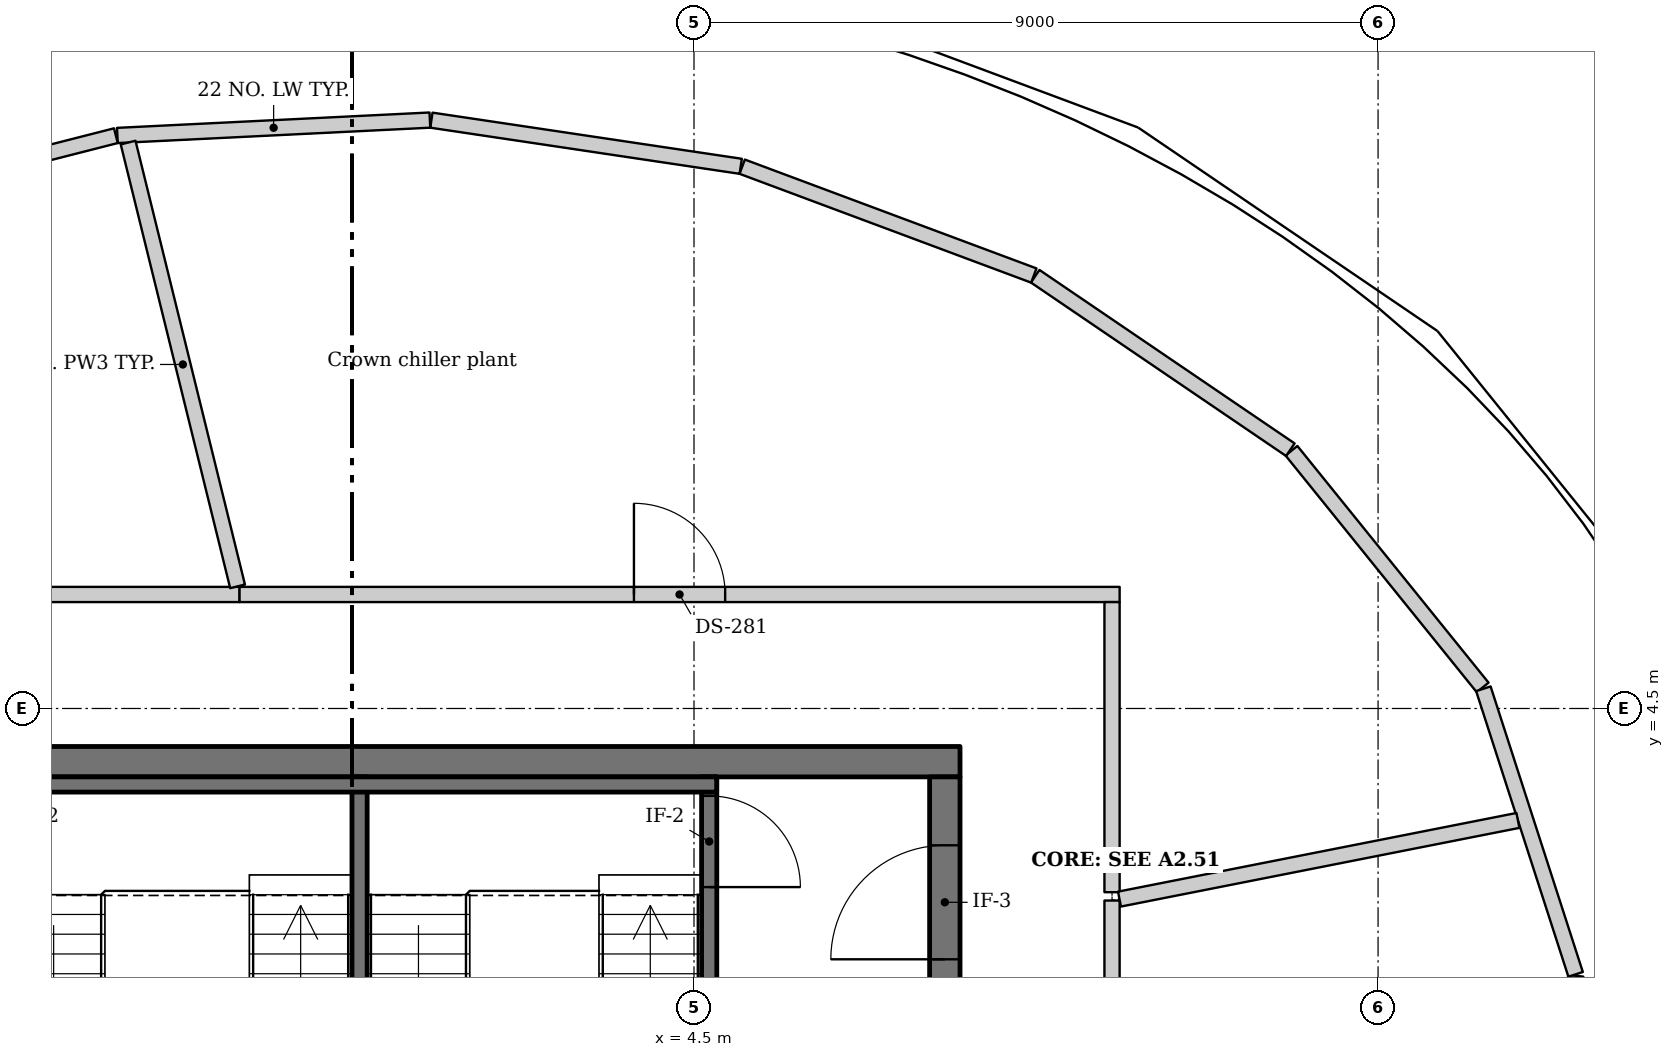
"""IFC4 building model, lengths in metres.
Left out: names, types, materials, properties, quantities, classifications, styles, units other than length and angle.
Written with IfcOpenShell. Run it as: python <this file> out.ifc"""

import sys

from ifc_helpers import new_model, si_unit, direction, frame, frame_2d, origin, place, context, subcontext, project, spatial, rectangle, extrude, source, transform, mapped, element, fill, save


model = new_model("IFC4")
c1 = context("Model", 3, precision=1e-05, world=origin(), true_north=direction((0.0, 1.0)))
c2 = subcontext(c1, "Body", "Model", "MODEL_VIEW")
j1 = project(units=[si_unit("LENGTHUNIT", "METRE"), si_unit("PLANEANGLEUNIT", "RADIAN")], contexts=[c1])
p1 = place(None, origin())
s1 = spatial("IfcSite", under=j1, at=p1, CompositionType="ELEMENT")
p2 = place(p1, origin())
s2 = spatial("IfcBuilding", under=s1, at=p2, CompositionType="ELEMENT")
p3 = place(p2, frame((0.0, 0.0, 356.5)))
s3 = spatial("IfcBuildingStorey", under=s2, at=p3, CompositionType="ELEMENT", Elevation=356.5)
m1 = source(origin(), c2, "Body", "SweptSolid", [
    extrude(rectangle(XDim=16.0, YDim=0.4, at=frame_2d((8.0, 0.0))), origin(), (0.0, 0.0, 1.0), 4.25),
])
p4 = place(p3, frame((-8.0, 3.8, 0.0), z_axis=(0.0, 0.0, 1.0), x_axis=(1.0, 0.0, 0.0)))
e1 = element("IfcWall", 1, at=p4, inside=s3, PredefinedType="SHEAR", context=c2, shape_type="MappedRepresentation", body=[
    mapped(m1, transform((0.0, 0.0, 0.0))),
])
m2 = source(origin(), c2, "Body", "SweptSolid", [
    extrude(rectangle(XDim=7.2, YDim=0.4, at=frame_2d((3.6, 0.0))), origin(), (0.0, 0.0, 1.0), 4.25),
])
p5 = place(p3, frame((7.8, -3.6, 0.0), z_axis=(0.0, 0.0, 1.0), x_axis=(0.0, 1.0, 0.0)))
e2 = element("IfcWall", 2, at=p5, inside=s3, PredefinedType="SHEAR", context=c2, shape_type="MappedRepresentation", body=[
    mapped(m2, transform((0.0, 0.0, 0.0))),
])
m3 = source(origin(), c2, "Body", "SweptSolid", [
    extrude(rectangle(XDim=1.5, YDim=2.1, at=frame_2d((0.75, 1.05))), frame((0.0, 0.21, 0.0), z_axis=(0.0, -1.0, 0.0), x_axis=(1.0, 0.0, 0.0)), (0.0, 0.0, 1.0), 0.42),
])
p6 = place(p5, frame((4.8, 0.0, 0.0)))
e3 = element("IfcOpeningElement", 3, at=p6, cuts=e2, PredefinedType="OPENING", context=c2, shape_type="MappedRepresentation", body=[
    mapped(m3, transform((0.0, 0.0, 0.0))),
])
m4 = source(origin(), c2, "Body", "SweptSolid", [
    extrude(rectangle(XDim=4.004, YDim=0.2, at=frame_2d((2.002, 0.0))), origin(), (0.0, 0.0, 1.0), 4.25),
])
p7 = place(p3, frame((12.361, 7.892, 0.0), z_axis=(0.0, 0.0, 1.0), x_axis=(0.628317235809, -0.777957229663, 0.0)))
e4 = element("IfcWall", 4, at=p7, inside=s3, PredefinedType="SOLIDWALL", context=c2, shape_type="MappedRepresentation", body=[
    mapped(m4, transform((0.0, 0.0, 0.0))),
])
m5 = source(origin(), c2, "Body", "SweptSolid", [
    extrude(rectangle(XDim=4.06, YDim=0.2, at=frame_2d((2.03, 0.0))), origin(), (0.0, 0.0, 1.0), 4.25),
])
p8 = place(p3, frame((8.989, 10.188, 0.0), z_axis=(0.0, 0.0, 1.0), x_axis=(0.826945516506, -0.562282057984, 0.0)))
e5 = element("IfcWall", 5, at=p8, inside=s3, PredefinedType="SOLIDWALL", context=c2, shape_type="MappedRepresentation", body=[
    mapped(m5, transform((0.0, 0.0, 0.0))),
])
m6 = source(origin(), c2, "Body", "SweptSolid", [
    extrude(rectangle(XDim=4.095, YDim=0.2, at=frame_2d((2.048, 0.0))), origin(), (0.0, 0.0, 1.0), 4.25),
])
p9 = place(p3, frame((5.134, 11.629, 0.0), z_axis=(0.0, 0.0, 1.0), x_axis=(0.936867035119, -0.349685799695, 0.0)))
e6 = element("IfcWall", 6, at=p9, inside=s3, PredefinedType="SOLIDWALL", context=c2, shape_type="MappedRepresentation", body=[
    mapped(m6, transform((0.0, 0.0, 0.0))),
])
m7 = source(origin(), c2, "Body", "SweptSolid", [
    extrude(rectangle(XDim=4.115, YDim=0.2, at=frame_2d((2.057, 0.0))), origin(), (0.0, 0.0, 1.0), 4.25),
])
p10 = place(p3, frame((1.045, 12.241, 0.0), z_axis=(0.0, 0.0, 1.0), x_axis=(0.989052252856, -0.147565717971, 0.0)))
e7 = element("IfcWall", 7, at=p10, inside=s3, PredefinedType="SOLIDWALL", context=c2, shape_type="MappedRepresentation", body=[
    mapped(m7, transform((0.0, 0.0, 0.0))),
])
m8 = source(origin(), c2, "Body", "SweptSolid", [
    extrude(rectangle(XDim=4.116, YDim=0.2, at=frame_2d((2.058, 0.0))), origin(), (0.0, 0.0, 1.0), 4.25),
])
p11 = place(p3, frame((-3.086, 12.04, 0.0), z_axis=(0.0, 0.0, 1.0), x_axis=(0.998790641863, 0.049165574616, 0.0)))
e8 = element("IfcWall", 8, at=p11, inside=s3, PredefinedType="SOLIDWALL", context=c2, shape_type="MappedRepresentation", body=[
    mapped(m8, transform((0.0, 0.0, 0.0))),
])
m9 = source(origin(), c2, "Body", "SweptSolid", [
    extrude(rectangle(XDim=4.107, YDim=0.2, at=frame_2d((2.054, 0.0))), origin(), (0.0, 0.0, 1.0), 4.25),
])
p12 = place(p3, frame((-7.086, 11.021, 0.0), z_axis=(0.0, 0.0, 1.0), x_axis=(0.96894922759, 0.247259770996, 0.0)))
e9 = element("IfcWall", 9, at=p12, inside=s3, PredefinedType="SOLIDWALL", context=c2, shape_type="MappedRepresentation", body=[
    mapped(m9, transform((0.0, 0.0, 0.0))),
])
m10 = source(origin(), c2, "Body", "SweptSolid", [
    extrude(rectangle(XDim=3.933, YDim=0.2, at=frame_2d((1.966, 0.0))), origin(), (0.0, 0.0, 1.0), 4.25),
])
p13 = place(p3, frame((16.101, 0.983, 0.0), z_axis=(0.0, 0.0, 1.0), x_axis=(-0.10577691274, -0.994389885674, 0.0)))
e10 = element("IfcWall", 10, at=p13, inside=s3, PredefinedType="SOLIDWALL", context=c2, shape_type="MappedRepresentation", body=[
    mapped(m10, transform((0.0, 0.0, 0.0))),
])
m11 = source(origin(), c2, "Body", "SweptSolid", [
    extrude(rectangle(XDim=3.948, YDim=0.2, at=frame_2d((1.974, 0.0))), origin(), (0.0, 0.0, 1.0), 4.25),
])
p14 = place(p3, frame((14.885, 4.76, 0.0), z_axis=(0.0, 0.0, 1.0), x_axis=(0.307365880997, -0.951591411898, 0.0)))
e11 = element("IfcWall", 11, at=p14, inside=s3, PredefinedType="SOLIDWALL", context=c2, shape_type="MappedRepresentation", body=[
    mapped(m11, transform((0.0, 0.0, 0.0))),
])
m12 = source(origin(), c2, "Body", "SweptSolid", [
    extrude(rectangle(XDim=7.2, YDim=0.2, at=frame_2d((3.6, 0.0))), origin(), (0.0, 0.0, 1.0), 4.25),
])
p15 = place(p3, frame((0.1, 3.6, 0.0), z_axis=(0.0, 0.0, 1.0), x_axis=(0.0, -1.0, 0.0)))
e12 = element("IfcWall", 12, at=p15, inside=s3, PredefinedType="SHEAR", context=c2, shape_type="MappedRepresentation", body=[
    mapped(m12, transform((0.0, 0.0, 0.0))),
])
p16 = place(p3, frame((4.7, -3.6, 0.0), z_axis=(0.0, 0.0, 1.0), x_axis=(0.0, 1.0, 0.0)))
e13 = element("IfcWall", 13, at=p16, inside=s3, PredefinedType="SHEAR", context=c2, shape_type="MappedRepresentation", body=[
    mapped(m12, transform((0.0, 0.0, 0.0))),
])
m13 = source(origin(), c2, "Body", "SweptSolid", [
    extrude(rectangle(XDim=1.2, YDim=2.1, at=frame_2d((0.6, 1.05))), frame((0.0, 0.11, 0.0), z_axis=(0.0, -1.0, 0.0), x_axis=(1.0, 0.0, 0.0)), (0.0, 0.0, 1.0), 0.22),
])
p17 = place(p16, frame((5.75, 0.0, 0.0)))
e14 = element("IfcOpeningElement", 14, at=p17, cuts=e13, PredefinedType="OPENING", context=c2, shape_type="MappedRepresentation", body=[
    mapped(m13, transform((0.0, 0.0, 0.0))),
])
m14 = source(origin(), c2, "Body", "SweptSolid", [
    extrude(rectangle(XDim=9.596, YDim=0.2, at=frame_2d((4.798, 0.0))), origin(), (0.0, 0.0, 1.0), 4.25),
])
p18 = place(p3, frame((4.798, 3.5, 0.0), z_axis=(0.0, 0.0, 1.0), x_axis=(-1.0, 0.0, 0.0)))
e15 = element("IfcWall", 15, at=p18, inside=s3, PredefinedType="SHEAR", context=c2, shape_type="MappedRepresentation", body=[
    mapped(m14, transform((0.0, 0.0, 0.0))),
])
m15 = source(origin(), c2, "Body", "SweptSolid", [
    extrude(rectangle(XDim=8.621, YDim=0.2, at=frame_2d((4.311, 0.0))), origin(), (0.0, 0.0, 1.0), 4.25),
])
p19 = place(p3, frame((-10.1, 6.0, 0.0), z_axis=(0.0, 0.0, 1.0), x_axis=(1.0, 0.0, 0.0)))
e16 = element("IfcWall", 16, at=p19, inside=s3, PredefinedType="PARTITIONING", context=c2, shape_type="MappedRepresentation", body=[
    mapped(m15, transform((0.0, 0.0, 0.0))),
])
p20 = place(p19, frame((3.711, 0.0, 0.0)))
e17 = element("IfcOpeningElement", 17, at=p20, cuts=e16, PredefinedType="OPENING", context=c2, shape_type="MappedRepresentation", body=[
    mapped(m13, transform((0.0, 0.0, 0.0))),
])
m16 = source(origin(), c2, "Body", "SweptSolid", [
    extrude(rectangle(XDim=6.014, YDim=0.2, at=frame_2d((3.007, 0.0))), origin(), (0.0, 0.0, 1.0), 4.25),
])
p21 = place(p3, frame((-1.505, 6.107, 0.0), z_axis=(0.0, 0.0, 1.0), x_axis=(-0.239468317603, 0.970904179033, 0.0)))
e18 = element("IfcWall", 18, at=p21, inside=s3, PredefinedType="PARTITIONING", context=c2, shape_type="MappedRepresentation", body=[
    mapped(m16, transform((0.0, 0.0, 0.0))),
])
m17 = source(origin(), c2, "Body", "SweptSolid", [
    extrude(rectangle(XDim=11.579, YDim=0.2, at=frame_2d((5.79, 0.0))), origin(), (0.0, 0.0, 1.0), 4.25),
])
p22 = place(p3, frame((-1.479, 6.0, 0.0), z_axis=(0.0, 0.0, 1.0), x_axis=(1.0, 0.0, 0.0)))
e19 = element("IfcWall", 19, at=p22, inside=s3, PredefinedType="PARTITIONING", context=c2, shape_type="MappedRepresentation", body=[
    mapped(m17, transform((0.0, 0.0, 0.0))),
])
p23 = place(p22, frame((5.189, 0.0, 0.0)))
e20 = element("IfcOpeningElement", 20, at=p23, cuts=e19, PredefinedType="OPENING", context=c2, shape_type="MappedRepresentation", body=[
    mapped(m13, transform((0.0, 0.0, 0.0))),
])
m18 = source(origin(), c2, "Body", "SweptSolid", [
    extrude(rectangle(XDim=7.873, YDim=0.2, at=frame_2d((3.937, 0.0))), origin(), (0.0, 0.0, 1.0), 4.25),
])
p24 = place(p3, frame((10.0, 1.973, 0.0), z_axis=(0.0, 0.0, 1.0), x_axis=(0.0, -1.0, 0.0)))
e21 = element("IfcWall", 21, at=p24, inside=s3, PredefinedType="PARTITIONING", context=c2, shape_type="MappedRepresentation", body=[
    mapped(m18, transform((0.0, 0.0, 0.0))),
])
m19 = source(origin(), c2, "Body", "SweptSolid", [
    extrude(rectangle(XDim=3.817, YDim=0.2, at=frame_2d((1.908, 0.0))), origin(), (0.0, 0.0, 1.0), 4.25),
])
p25 = place(p3, frame((10.0, 5.9, 0.0), z_axis=(0.0, 0.0, 1.0), x_axis=(0.0, -1.0, 0.0)))
e22 = element("IfcWall", 22, at=p25, inside=s3, PredefinedType="PARTITIONING", context=c2, shape_type="MappedRepresentation", body=[
    mapped(m19, transform((0.0, 0.0, 0.0))),
])
m20 = source(origin(), c2, "Body", "SweptSolid", [
    extrude(rectangle(XDim=5.344, YDim=0.2, at=frame_2d((2.672, 0.0))), origin(), (0.0, 0.0, 1.0), 4.25),
])
p26 = place(p3, frame((15.34, 3.027, 0.0), z_axis=(0.0, 0.0, 1.0), x_axis=(-0.981055750952, -0.193725614011, 0.0)))
e23 = element("IfcWall", 23, at=p26, inside=s3, PredefinedType="PARTITIONING", context=c2, shape_type="MappedRepresentation", body=[
    mapped(m20, transform((0.0, 0.0, 0.0))),
])
m21 = source(origin(), c2, "Body", "SweptSolid", [
    extrude(rectangle(XDim=1.2, YDim=2.1, at=frame_2d((0.6, 1.05))), frame((0.0, 0.025, 0.0), z_axis=(0.0, -1.0, 0.0), x_axis=(1.0, 0.0, 0.0)), (0.0, 0.0, 1.0), 0.05),
])
p27 = place(p17, origin())
e24 = element("IfcDoor", 24, at=p27, inside=s3, OperationType="SINGLE_SWING_RIGHT", PredefinedType="DOOR", context=c2, shape_type="MappedRepresentation", body=[
    mapped(m21, transform((0.0, 0.0, 0.0))),
])
fill(e14, e24)
m22 = source(origin(), c2, "Body", "SweptSolid", [
    extrude(rectangle(XDim=1.5, YDim=2.1, at=frame_2d((0.75, 1.05))), frame((0.0, 0.025, 0.0), z_axis=(0.0, -1.0, 0.0), x_axis=(1.0, 0.0, 0.0)), (0.0, 0.0, 1.0), 0.05),
])
p28 = place(p6, origin())
e25 = element("IfcDoor", 25, at=p28, inside=s3, OperationType="DOUBLE_DOOR_SINGLE_SWING", PredefinedType="DOOR", context=c2, shape_type="MappedRepresentation", body=[
    mapped(m22, transform((0.0, 0.0, 0.0))),
])
fill(e3, e25)
m23 = source(origin(), c2, "Body", "SweptSolid", [
    extrude(rectangle(XDim=1.2, YDim=2.1, at=frame_2d((0.6, 1.05))), frame((0.0, 0.025, 0.0), z_axis=(0.0, -1.0, 0.0), x_axis=(1.0, 0.0, 0.0)), (0.0, 0.0, 1.0), 0.05),
])
p29 = place(p23, origin())
e26 = element("IfcDoor", 26, at=p29, inside=s3, OperationType="SINGLE_SWING_LEFT", PredefinedType="DOOR", context=c2, shape_type="MappedRepresentation", body=[
    mapped(m23, transform((0.0, 0.0, 0.0))),
])
fill(e20, e26)
save(model, sys.argv[1])
